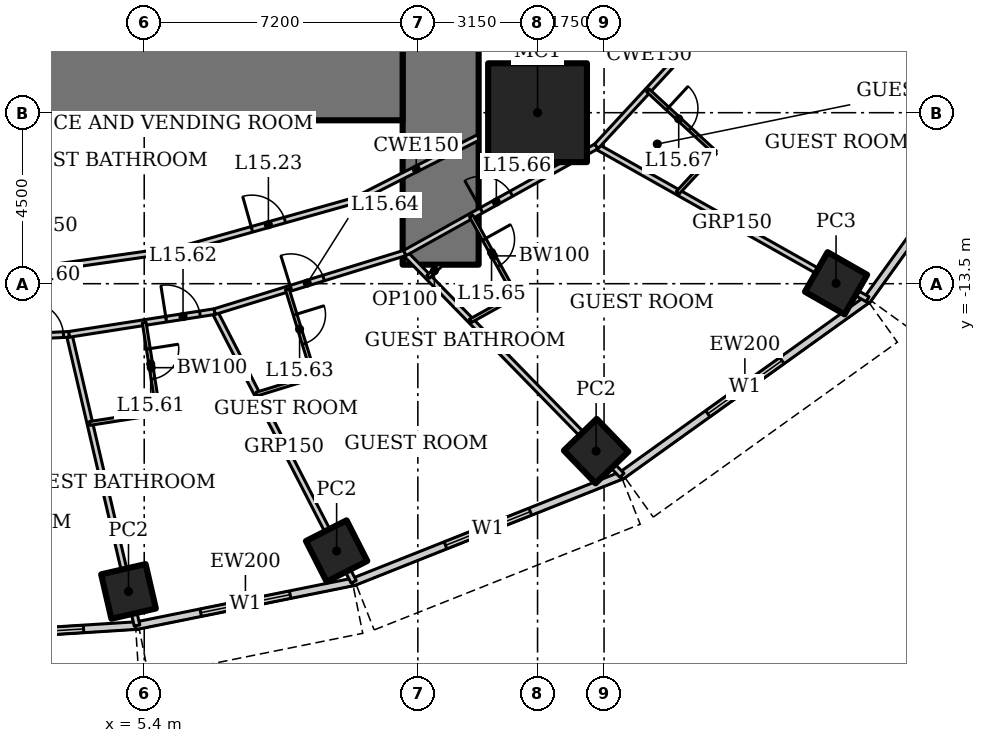
"""IFC4 building model, lengths in metres.
Left out: names, types, materials, properties, quantities, classifications, styles, units other than length and angle.
Written with IfcOpenShell. Run it as: python <this file> out.ifc"""

import sys

from ifc_helpers import new_model, si_unit, direction, frame, frame_2d, origin, origin_2d, place, context, subcontext, project, spatial, rectangle, hollow_rectangle, extrude, element, fill, save


model = new_model("IFC4")
c1 = context("Model", 3, precision=1e-05, world=origin(), true_north=direction((0.0, 1.0)))
c2 = subcontext(c1, "Body", "Model", "MODEL_VIEW")
j1 = project(units=[si_unit("LENGTHUNIT", "METRE"), si_unit("PLANEANGLEUNIT", "RADIAN")], contexts=[c1])
p1 = place(None, origin())
s1 = spatial("IfcSite", under=j1, at=p1, CompositionType="ELEMENT")
p2 = place(p1, origin())
s2 = spatial("IfcBuilding", under=s1, at=p2, CompositionType="ELEMENT")
p3 = place(p2, frame((0.0, 0.0, 69.4)))
s3 = spatial("IfcBuildingStorey", under=s2, at=p3, CompositionType="ELEMENT", Elevation=69.4)
p4 = place(p3, frame((15.75, -9.0, 0.0), z_axis=(0.0, 0.0, 1.0), x_axis=(1.0, 0.0, 0.0)))
e1 = element("IfcColumn", 1, at=p4, inside=s3, PredefinedType="COLUMN", context=c2, shape_type="SweptSolid", body=[
    extrude(hollow_rectangle(XDim=2.6, YDim=2.6, WallThickness=0.13, at=origin_2d()), origin(), (0.0, 0.0, 1.0), 3.6),
])
for number, where, z_axis, x_axis in (
    (2, (4.986, -21.598, 0.0), (0.0, 0.0, 1.0), (0.974, 0.225, 0.0)),
    (3, (10.463, -20.534, 0.0), (0.0, 0.0, 1.0), (0.891, 0.454, 0.0)),
    (4, (17.291, -17.905, 0.0), (0.0, 0.0, 1.0), (0.719, 0.695, 0.0)),
):
    element("IfcColumn", number, at=place(p3, frame(where, z_axis=z_axis, x_axis=x_axis)), inside=s3, PredefinedType="COLUMN", context=c2, shape_type="SweptSolid", body=[
        extrude(hollow_rectangle(XDim=1.2, YDim=1.2, WallThickness=0.1, at=origin_2d()), origin(), (0.0, 0.0, 1.0), 3.6),
    ])
p5 = place(p3, frame((23.605, -13.489, 0.0), z_axis=(0.0, 0.0, 1.0), x_axis=(0.496139221777, 0.86824298017, 0.0)))
e5 = element("IfcColumn", 5, at=p5, inside=s3, PredefinedType="COLUMN", context=c2, shape_type="SweptSolid", body=[
    extrude(hollow_rectangle(XDim=1.2, YDim=1.2, WallThickness=0.12, at=origin_2d()), origin(), (0.0, 0.0, 1.0), 3.6),
])
p6 = place(p3, frame((13.2, -13.0, 0.0), z_axis=(0.0, 0.0, 1.0), x_axis=(0.0, 1.0, 0.0)))
e6 = element("IfcWall", 6, at=p6, inside=s3, PredefinedType="SHEAR", context=c2, shape_type="SweptSolid", body=[
    extrude(rectangle(XDim=26.0, YDim=2.0, at=frame_2d((13.0, 0.0))), origin(), (0.0, 0.0, 1.0), 3.6),
])
p7 = place(p6, frame((12.1, 0.0, 0.0)))
e7 = element("IfcOpeningElement", 7, at=p7, cuts=e6, PredefinedType="OPENING", context=c2, shape_type="SweptSolid", body=[
    extrude(rectangle(XDim=1.8, YDim=2.1, at=frame_2d((0.9, 1.05))), frame((0.0, 1.01, 0.0), z_axis=(0.0, -1.0, 0.0), x_axis=(1.0, 0.0, 0.0)), (0.0, 0.0, 1.0), 2.02),
])
p8 = place(p3, frame((-12.2, -8.0, 0.0), z_axis=(0.0, 0.0, 1.0), x_axis=(1.0, 0.0, 0.0)))
e8 = element("IfcWall", 8, at=p8, inside=s3, PredefinedType="SHEAR", context=c2, shape_type="SweptSolid", body=[
    extrude(rectangle(XDim=24.4, YDim=2.4, at=frame_2d((12.2, 0.0))), origin(), (0.0, 0.0, 1.0), 3.6),
])
p9 = place(p3, frame((-0.041, -22.827, 0.0), z_axis=(0.0, 0.0, 1.0), x_axis=(0.998018582375, 0.062919863585, 0.0)))
e9 = element("IfcWall", 9, at=p9, inside=s3, PredefinedType="SOLIDWALL", context=c2, shape_type="SweptSolid", body=[
    extrude(rectangle(XDim=5.304, YDim=0.2, at=frame_2d((2.652, 0.0))), origin(), (0.0, 0.0, 1.0), 3.45),
])
p10 = place(p9, frame((1.452, 0.0, 0.5)))
e10 = element("IfcOpeningElement", 10, at=p10, cuts=e9, PredefinedType="OPENING", context=c2, shape_type="SweptSolid", body=[
    extrude(rectangle(XDim=2.4, YDim=2.2, at=frame_2d((1.2, 1.1))), frame((0.0, 0.11, 0.0), z_axis=(0.0, -1.0, 0.0), x_axis=(1.0, 0.0, 0.0)), (0.0, 0.0, 1.0), 0.22),
])
p11 = place(p3, frame((5.17, -22.504, 0.0), z_axis=(0.0, 0.0, 1.0), x_axis=(0.980251657452, 0.197754110105, 0.0)))
e11 = element("IfcWall", 11, at=p11, inside=s3, PredefinedType="SOLIDWALL", context=c2, shape_type="SweptSolid", body=[
    extrude(rectangle(XDim=5.904, YDim=0.2, at=frame_2d((2.952, 0.0))), origin(), (0.0, 0.0, 1.0), 3.45),
])
p12 = place(p11, frame((1.752, 0.0, 0.5)))
e12 = element("IfcOpeningElement", 12, at=p12, cuts=e11, PredefinedType="OPENING", context=c2, shape_type="SweptSolid", body=[
    extrude(rectangle(XDim=2.4, YDim=2.2, at=frame_2d((1.2, 1.1))), frame((0.0, 0.11, 0.0), z_axis=(0.0, -1.0, 0.0), x_axis=(1.0, 0.0, 0.0)), (0.0, 0.0, 1.0), 0.22),
])
p13 = place(p3, frame((10.869, -21.363, 0.0), z_axis=(0.0, 0.0, 1.0), x_axis=(0.929358351251, 0.369178892895, 0.0)))
e13 = element("IfcWall", 13, at=p13, inside=s3, PredefinedType="SOLIDWALL", context=c2, shape_type="SweptSolid", body=[
    extrude(rectangle(XDim=7.692, YDim=0.2, at=frame_2d((3.846, 0.0))), origin(), (0.0, 0.0, 1.0), 3.45),
])
p14 = place(p13, frame((2.646, 0.0, 0.5)))
e14 = element("IfcOpeningElement", 14, at=p14, cuts=e13, PredefinedType="OPENING", context=c2, shape_type="SweptSolid", body=[
    extrude(rectangle(XDim=2.4, YDim=2.2, at=frame_2d((1.2, 1.1))), frame((0.0, 0.11, 0.0), z_axis=(0.0, -1.0, 0.0), x_axis=(1.0, 0.0, 0.0)), (0.0, 0.0, 1.0), 0.22),
])
p15 = place(p3, frame((17.929, -18.572, 0.0), z_axis=(0.0, 0.0, 1.0), x_axis=(0.812791321576, 0.582554948112, 0.0)))
e15 = element("IfcWall", 15, at=p15, inside=s3, PredefinedType="SOLIDWALL", context=c2, shape_type="SweptSolid", body=[
    extrude(rectangle(XDim=8.063, YDim=0.2, at=frame_2d((4.032, 0.0))), origin(), (0.0, 0.0, 1.0), 3.45),
])
p16 = place(p15, frame((2.832, 0.0, 0.5)))
e16 = element("IfcOpeningElement", 16, at=p16, cuts=e15, PredefinedType="OPENING", context=c2, shape_type="SweptSolid", body=[
    extrude(rectangle(XDim=2.4, YDim=2.2, at=frame_2d((1.2, 1.1))), frame((0.0, 0.11, 0.0), z_axis=(0.0, -1.0, 0.0), x_axis=(1.0, 0.0, 0.0)), (0.0, 0.0, 1.0), 0.22),
])
p17 = place(p3, frame((24.4, -13.957, 0.0), z_axis=(0.0, 0.0, 1.0), x_axis=(0.583937613703, 0.811798536155, 0.0)))
e17 = element("IfcWall", 17, at=p17, inside=s3, PredefinedType="SOLIDWALL", context=c2, shape_type="SweptSolid", body=[
    extrude(rectangle(XDim=8.323, YDim=0.2, at=frame_2d((4.162, 0.0))), origin(), (0.0, 0.0, 1.0), 3.45),
])
p18 = place(p17, frame((2.961, 0.0, 0.5)))
e18 = element("IfcOpeningElement", 18, at=p18, cuts=e17, PredefinedType="OPENING", context=c2, shape_type="SweptSolid", body=[
    extrude(rectangle(XDim=2.4, YDim=2.2, at=frame_2d((1.2, 1.1))), frame((0.0, 0.11, 0.0), z_axis=(0.0, -1.0, 0.0), x_axis=(1.0, 0.0, 0.0)), (0.0, 0.0, 1.0), 0.22),
])
p19 = place(p3, frame((5.211, -22.496, 0.0), z_axis=(0.0, 0.0, 1.0), x_axis=(-0.227056984461, 0.973881474209, 0.0)))
e19 = element("IfcWall", 19, at=p19, inside=s3, PredefinedType="PARTITIONING", context=c2, shape_type="SweptSolid", body=[
    extrude(rectangle(XDim=7.869, YDim=0.15, at=frame_2d((3.934, 0.0))), origin(), (0.0, 0.0, 1.0), 2.767),
])
p20 = place(p3, frame((10.912, -21.346, 0.0), z_axis=(0.0, 0.0, 1.0), x_axis=(-0.45752665959, 0.889195904042, 0.0)))
e20 = element("IfcWall", 20, at=p20, inside=s3, PredefinedType="PARTITIONING", context=c2, shape_type="SweptSolid", body=[
    extrude(rectangle(XDim=7.997, YDim=0.15, at=frame_2d((3.999, 0.0))), origin(), (0.0, 0.0, 1.0), 2.528),
])
p21 = place(p3, frame((17.97, -18.542, 0.0), z_axis=(0.0, 0.0, 1.0), x_axis=(-0.698757291878, 0.715358823981, 0.0)))
e21 = element("IfcWall", 21, at=p21, inside=s3, PredefinedType="PARTITIONING", context=c2, shape_type="SweptSolid", body=[
    extrude(rectangle(XDim=8.177, YDim=0.15, at=frame_2d((4.088, 0.0))), origin(), (0.0, 0.0, 1.0), 2.528),
])
p22 = place(p3, frame((24.435, -13.909, 0.0), z_axis=(0.0, 0.0, 1.0), x_axis=(-0.871075246657, 0.491149584813, 0.0)))
e22 = element("IfcWall", 22, at=p22, inside=s3, PredefinedType="PARTITIONING", context=c2, shape_type="SweptSolid", body=[
    extrude(rectangle(XDim=8.192, YDim=0.15, at=frame_2d((4.096, 0.0))), origin(), (0.0, 0.0, 1.0), 2.693),
])
p23 = place(p3, frame((0.0, -15.0, 0.0), z_axis=(0.0, 0.0, 1.0), x_axis=(0.998809560203, 0.048779733975, 0.0)))
e23 = element("IfcWall", 23, at=p23, inside=s3, PredefinedType="PARTITIONING", context=c2, shape_type="SweptSolid", body=[
    extrude(rectangle(XDim=3.428, YDim=0.15, at=frame_2d((1.714, 0.0))), origin(), (0.0, 0.0, 1.0), 3.45),
])
p24 = place(p23, frame((2.378, 0.0, 0.0)))
e24 = element("IfcOpeningElement", 24, at=p24, cuts=e23, PredefinedType="OPENING", context=c2, shape_type="SweptSolid", body=[
    extrude(rectangle(XDim=0.9, YDim=2.1, at=frame_2d((0.45, 1.05))), frame((0.0, 0.085, 0.0), z_axis=(0.0, -1.0, 0.0), x_axis=(1.0, 0.0, 0.0)), (0.0, 0.0, 1.0), 0.17),
])
p25 = place(p3, frame((3.424, -14.833, 0.0), z_axis=(0.0, 0.0, 1.0), x_axis=(0.988015036573, 0.154357660987, 0.0)))
e25 = element("IfcWall", 25, at=p25, inside=s3, PredefinedType="PARTITIONING", context=c2, shape_type="SweptSolid", body=[
    extrude(rectangle(XDim=3.875, YDim=0.15, at=frame_2d((1.938, 0.0))), origin(), (0.0, 0.0, 1.0), 3.45),
])
p26 = place(p25, frame((2.583, 0.0, 0.0)))
e26 = element("IfcOpeningElement", 26, at=p26, cuts=e25, PredefinedType="OPENING", context=c2, shape_type="SweptSolid", body=[
    extrude(rectangle(XDim=0.9, YDim=2.1, at=frame_2d((0.45, 1.05))), frame((0.0, 0.085, 0.0), z_axis=(0.0, -1.0, 0.0), x_axis=(1.0, 0.0, 0.0)), (0.0, 0.0, 1.0), 0.17),
])
p27 = place(p3, frame((7.253, -14.235, 0.0), z_axis=(0.0, 0.0, 1.0), x_axis=(0.955657956744, 0.294478980085, 0.0)))
e27 = element("IfcWall", 27, at=p27, inside=s3, PredefinedType="PARTITIONING", context=c2, shape_type="SweptSolid", body=[
    extrude(rectangle(XDim=5.236, YDim=0.15, at=frame_2d((2.618, 0.0))), origin(), (0.0, 0.0, 1.0), 3.45),
])
p28 = place(p27, frame((2.1, 0.0, 0.0)))
e28 = element("IfcOpeningElement", 28, at=p28, cuts=e27, PredefinedType="OPENING", context=c2, shape_type="SweptSolid", body=[
    extrude(rectangle(XDim=0.9, YDim=2.1, at=frame_2d((0.45, 1.05))), frame((0.0, 0.085, 0.0), z_axis=(0.0, -1.0, 0.0), x_axis=(1.0, 0.0, 0.0)), (0.0, 0.0, 1.0), 0.17),
])
p29 = place(p3, frame((12.257, -12.693, 0.0), z_axis=(0.0, 0.0, 1.0), x_axis=(0.873695910579, 0.486472461541, 0.0)))
e29 = element("IfcWall", 29, at=p29, inside=s3, PredefinedType="PARTITIONING", context=c2, shape_type="SweptSolid", body=[
    extrude(rectangle(XDim=5.771, YDim=0.15, at=frame_2d((2.885, 0.0))), origin(), (0.0, 0.0, 1.0), 3.45),
])
p30 = place(p29, frame((2.306, 0.0, 0.0)))
e30 = element("IfcOpeningElement", 30, at=p30, cuts=e29, PredefinedType="OPENING", context=c2, shape_type="SweptSolid", body=[
    extrude(rectangle(XDim=0.9, YDim=2.1, at=frame_2d((0.45, 1.05))), frame((0.0, 0.085, 0.0), z_axis=(0.0, -1.0, 0.0), x_axis=(1.0, 0.0, 0.0)), (0.0, 0.0, 1.0), 0.17),
])
p31 = place(p3, frame((17.299, -9.885, 0.0), z_axis=(0.0, 0.0, 1.0), x_axis=(0.678641806296, 0.734469399463, 0.0)))
e31 = element("IfcWall", 31, at=p31, inside=s3, PredefinedType="PARTITIONING", context=c2, shape_type="SweptSolid", body=[
    extrude(rectangle(XDim=6.166, YDim=0.15, at=frame_2d((3.083, 0.0))), origin(), (0.0, 0.0, 1.0), 3.45),
])
p32 = place(p31, frame((5.116, 0.0, 0.0)))
e32 = element("IfcOpeningElement", 32, at=p32, cuts=e31, PredefinedType="OPENING", context=c2, shape_type="SweptSolid", body=[
    extrude(rectangle(XDim=0.9, YDim=2.1, at=frame_2d((0.45, 1.05))), frame((0.0, 0.085, 0.0), z_axis=(0.0, -1.0, 0.0), x_axis=(1.0, 0.0, 0.0)), (0.0, 0.0, 1.0), 0.17),
])
p33 = place(p3, frame((3.016, -13.066, 0.0), z_axis=(0.0, 0.0, 1.0), x_axis=(0.990002114939, 0.14105251652, 0.0)))
e33 = element("IfcWall", 33, at=p33, inside=s3, PredefinedType="PARTITIONING", context=c2, shape_type="SweptSolid", body=[
    extrude(rectangle(XDim=3.429, YDim=0.15, at=frame_2d((1.714, 0.0))), origin(), (0.0, 0.0, 1.0), 3.45),
])
p34 = place(p3, frame((6.411, -12.582, 0.0), z_axis=(0.0, 0.0, 1.0), x_axis=(0.962643729928, 0.270771211967, 0.0)))
e34 = element("IfcWall", 34, at=p34, inside=s3, PredefinedType="PARTITIONING", context=c2, shape_type="SweptSolid", body=[
    extrude(rectangle(XDim=4.688, YDim=0.15, at=frame_2d((2.344, 0.0))), origin(), (0.0, 0.0, 1.0), 3.45),
])
p35 = place(p34, frame((1.894, 0.0, 0.0)))
e35 = element("IfcOpeningElement", 35, at=p35, cuts=e34, PredefinedType="OPENING", context=c2, shape_type="SweptSolid", body=[
    extrude(rectangle(XDim=0.9, YDim=2.1, at=frame_2d((0.45, 1.05))), frame((0.0, 0.085, 0.0), z_axis=(0.0, -1.0, 0.0), x_axis=(1.0, 0.0, 0.0)), (0.0, 0.0, 1.0), 0.17),
])
p36 = place(p3, frame((5.4, -14.524, 0.0), z_axis=(0.0, 0.0, 1.0), x_axis=(0.154426532979, -0.988004274238, 0.0)))
e36 = element("IfcWall", 36, at=p36, inside=s3, PredefinedType="PARTITIONING", context=c2, shape_type="SweptSolid", body=[
    extrude(rectangle(XDim=2.4, YDim=0.1, at=frame_2d((1.2, 0.0))), origin(), (0.0, 0.0, 1.0), 3.45),
])
p37 = place(p36, frame((0.7, 0.0, 0.0)))
e37 = element("IfcOpeningElement", 37, at=p37, cuts=e36, PredefinedType="OPENING", context=c2, shape_type="SweptSolid", body=[
    extrude(rectangle(XDim=0.8, YDim=2.1, at=frame_2d((0.4, 1.05))), frame((0.0, 0.06, 0.0), z_axis=(0.0, -1.0, 0.0), x_axis=(1.0, 0.0, 0.0)), (0.0, 0.0, 1.0), 0.12),
])
p38 = place(p3, frame((5.771, -16.895, 0.0), z_axis=(0.0, 0.0, 1.0), x_axis=(-0.98801840204, -0.154336117711, 0.0)))
e38 = element("IfcWall", 38, at=p38, inside=s3, PredefinedType="PARTITIONING", context=c2, shape_type="SweptSolid", body=[
    extrude(rectangle(XDim=1.827, YDim=0.1, at=frame_2d((0.914, 0.0))), origin(), (0.0, 0.0, 1.0), 3.45),
])
p39 = place(p3, frame((9.164, -13.646, 0.0), z_axis=(0.0, 0.0, 1.0), x_axis=(0.294507586191, -0.955649141514, 0.0)))
e39 = element("IfcWall", 39, at=p39, inside=s3, PredefinedType="PARTITIONING", context=c2, shape_type="SweptSolid", body=[
    extrude(rectangle(XDim=2.4, YDim=0.1, at=frame_2d((1.2, 0.0))), origin(), (0.0, 0.0, 1.0), 3.45),
])
p40 = place(p39, frame((0.7, 0.0, 0.0)))
e40 = element("IfcOpeningElement", 40, at=p40, cuts=e39, PredefinedType="OPENING", context=c2, shape_type="SweptSolid", body=[
    extrude(rectangle(XDim=0.8, YDim=2.1, at=frame_2d((0.4, 1.05))), frame((0.0, 0.06, 0.0), z_axis=(0.0, -1.0, 0.0), x_axis=(1.0, 0.0, 0.0)), (0.0, 0.0, 1.0), 0.12),
])
p41 = place(p3, frame((9.871, -15.939, 0.0), z_axis=(0.0, 0.0, 1.0), x_axis=(-0.955642133669, -0.29453032502, 0.0)))
e41 = element("IfcWall", 41, at=p41, inside=s3, PredefinedType="PARTITIONING", context=c2, shape_type="SweptSolid", body=[
    extrude(rectangle(XDim=1.583, YDim=0.1, at=frame_2d((0.791, 0.0))), origin(), (0.0, 0.0, 1.0), 3.45),
])
p42 = place(p3, frame((14.004, -11.719, 0.0), z_axis=(0.0, 0.0, 1.0), x_axis=(0.486445964861, -0.873710663361, 0.0)))
e42 = element("IfcWall", 42, at=p42, inside=s3, PredefinedType="PARTITIONING", context=c2, shape_type="SweptSolid", body=[
    extrude(rectangle(XDim=2.4, YDim=0.1, at=frame_2d((1.2, 0.0))), origin(), (0.0, 0.0, 1.0), 3.45),
])
p43 = place(p42, frame((0.7, 0.0, 0.0)))
e43 = element("IfcOpeningElement", 43, at=p43, cuts=e42, PredefinedType="OPENING", context=c2, shape_type="SweptSolid", body=[
    extrude(rectangle(XDim=0.8, YDim=2.1, at=frame_2d((0.4, 1.05))), frame((0.0, 0.06, 0.0), z_axis=(0.0, -1.0, 0.0), x_axis=(1.0, 0.0, 0.0)), (0.0, 0.0, 1.0), 0.12),
])
p44 = place(p3, frame((15.172, -13.816, 0.0), z_axis=(0.0, 0.0, 1.0), x_axis=(-0.873640924532, -0.486571202377, 0.0)))
e44 = element("IfcWall", 44, at=p44, inside=s3, PredefinedType="PARTITIONING", context=c2, shape_type="SweptSolid", body=[
    extrude(rectangle(XDim=1.362, YDim=0.1, at=frame_2d((0.681, 0.0))), origin(), (0.0, 0.0, 1.0), 3.45),
])
p45 = place(p3, frame((18.656, -8.416, 0.0), z_axis=(0.0, 0.0, 1.0), x_axis=(0.73447964986, -0.678630712495, 0.0)))
e45 = element("IfcWall", 45, at=p45, inside=s3, PredefinedType="PARTITIONING", context=c2, shape_type="SweptSolid", body=[
    extrude(rectangle(XDim=2.4, YDim=0.1, at=frame_2d((1.2, 0.0))), origin(), (0.0, 0.0, 1.0), 3.45),
])
p46 = place(p45, frame((0.7, 0.0, 0.0)))
e46 = element("IfcOpeningElement", 46, at=p46, cuts=e45, PredefinedType="OPENING", context=c2, shape_type="SweptSolid", body=[
    extrude(rectangle(XDim=0.8, YDim=2.1, at=frame_2d((0.4, 1.05))), frame((0.0, 0.06, 0.0), z_axis=(0.0, -1.0, 0.0), x_axis=(1.0, 0.0, 0.0)), (0.0, 0.0, 1.0), 0.12),
])
p47 = place(p3, frame((20.419, -10.045, 0.0), z_axis=(0.0, 0.0, 1.0), x_axis=(-0.67861657312, -0.734492713842, 0.0)))
e47 = element("IfcWall", 47, at=p47, inside=s3, PredefinedType="PARTITIONING", context=c2, shape_type="SweptSolid", body=[
    extrude(rectangle(XDim=1.446, YDim=0.1, at=frame_2d((0.723, 0.0))), origin(), (0.0, 0.0, 1.0), 3.45),
])
p48 = place(p3, frame((13.2, -13.0, 0.0), z_axis=(0.0, 0.0, 1.0), x_axis=(-0.715289751842, -0.698827998087, 0.0)))
e48 = element("IfcWall", 48, at=p48, inside=s3, PredefinedType="PARTITIONING", context=c2, shape_type="SweptSolid", body=[
    extrude(rectangle(XDim=0.46, YDim=0.1, at=frame_2d((0.23, 0.0))), origin(), (0.0, 0.0, 1.0), 3.45),
])
p49 = place(p3, frame((2.035, -13.109, 0.0), z_axis=(0.0, 0.0, 1.0), x_axis=(0.999010128674, 0.044483286824, 0.0)))
e49 = element("IfcWall", 49, at=p49, inside=s3, PredefinedType="PARTITIONING", context=c2, shape_type="SweptSolid", body=[
    extrude(rectangle(XDim=0.982, YDim=0.15, at=frame_2d((0.491, 0.0))), origin(), (0.0, 0.0, 1.0), 3.45),
])
p50 = place(p3, frame((10.924, -11.312, 0.0), z_axis=(0.0, 0.0, 1.0), x_axis=(0.891394713219, 0.453227829292, 0.0)))
e50 = element("IfcWall", 50, at=p50, inside=s3, PredefinedType="PARTITIONING", context=c2, shape_type="SweptSolid", body=[
    extrude(rectangle(XDim=3.664, YDim=0.15, at=frame_2d((1.832, 0.0))), origin(), (0.0, 0.0, 1.0), 3.45),
])
p51 = place(p10, origin())
e51 = element("IfcWindow", 51, at=p51, inside=s3, PartitioningType="SINGLE_PANEL", PredefinedType="WINDOW", context=c2, shape_type="SweptSolid", body=[
    extrude(rectangle(XDim=2.4, YDim=2.2, at=frame_2d((1.2, 1.1))), frame((0.0, 0.03, 0.0), z_axis=(0.0, -1.0, 0.0), x_axis=(1.0, 0.0, 0.0)), (0.0, 0.0, 1.0), 0.06),
])
fill(e10, e51)
p52 = place(p12, origin())
e52 = element("IfcWindow", 52, at=p52, inside=s3, PartitioningType="SINGLE_PANEL", PredefinedType="WINDOW", context=c2, shape_type="SweptSolid", body=[
    extrude(rectangle(XDim=2.4, YDim=2.2, at=frame_2d((1.2, 1.1))), frame((0.0, 0.03, 0.0), z_axis=(0.0, -1.0, 0.0), x_axis=(1.0, 0.0, 0.0)), (0.0, 0.0, 1.0), 0.06),
])
fill(e12, e52)
p53 = place(p14, origin())
e53 = element("IfcWindow", 53, at=p53, inside=s3, PartitioningType="SINGLE_PANEL", PredefinedType="WINDOW", context=c2, shape_type="SweptSolid", body=[
    extrude(rectangle(XDim=2.4, YDim=2.2, at=frame_2d((1.2, 1.1))), frame((0.0, 0.03, 0.0), z_axis=(0.0, -1.0, 0.0), x_axis=(1.0, 0.0, 0.0)), (0.0, 0.0, 1.0), 0.06),
])
fill(e14, e53)
p54 = place(p16, origin())
e54 = element("IfcWindow", 54, at=p54, inside=s3, PartitioningType="SINGLE_PANEL", PredefinedType="WINDOW", context=c2, shape_type="SweptSolid", body=[
    extrude(rectangle(XDim=2.4, YDim=2.2, at=frame_2d((1.2, 1.1))), frame((0.0, 0.03, 0.0), z_axis=(0.0, -1.0, 0.0), x_axis=(1.0, 0.0, 0.0)), (0.0, 0.0, 1.0), 0.06),
])
fill(e16, e54)
p55 = place(p35, origin())
e55 = element("IfcDoor", 55, at=p55, inside=s3, OperationType="SINGLE_SWING_LEFT", PredefinedType="DOOR", context=c2, shape_type="SweptSolid", body=[
    extrude(rectangle(XDim=0.9, YDim=2.1, at=frame_2d((0.45, 1.05))), frame((0.0, 0.025, 0.0), z_axis=(0.0, -1.0, 0.0), x_axis=(1.0, 0.0, 0.0)), (0.0, 0.0, 1.0), 0.05),
])
fill(e35, e55)
p56 = place(p24, origin())
e56 = element("IfcDoor", 56, at=p56, inside=s3, OperationType="SINGLE_SWING_LEFT", PredefinedType="DOOR", context=c2, shape_type="SweptSolid", body=[
    extrude(rectangle(XDim=0.9, YDim=2.1, at=frame_2d((0.45, 1.05))), frame((0.0, 0.025, 0.0), z_axis=(0.0, -1.0, 0.0), x_axis=(1.0, 0.0, 0.0)), (0.0, 0.0, 1.0), 0.05),
])
fill(e24, e56)
p57 = place(p37, origin())
e57 = element("IfcDoor", 57, at=p57, inside=s3, OperationType="SINGLE_SWING_LEFT", PredefinedType="DOOR", context=c2, shape_type="SweptSolid", body=[
    extrude(rectangle(XDim=0.8, YDim=2.1, at=frame_2d((0.4, 1.05))), frame((0.0, 0.025, 0.0), z_axis=(0.0, -1.0, 0.0), x_axis=(1.0, 0.0, 0.0)), (0.0, 0.0, 1.0), 0.05),
])
fill(e37, e57)
p58 = place(p26, origin())
e58 = element("IfcDoor", 58, at=p58, inside=s3, OperationType="SINGLE_SWING_LEFT", PredefinedType="DOOR", context=c2, shape_type="SweptSolid", body=[
    extrude(rectangle(XDim=0.9, YDim=2.1, at=frame_2d((0.45, 1.05))), frame((0.0, 0.025, 0.0), z_axis=(0.0, -1.0, 0.0), x_axis=(1.0, 0.0, 0.0)), (0.0, 0.0, 1.0), 0.05),
])
fill(e26, e58)
p59 = place(p40, origin())
e59 = element("IfcDoor", 59, at=p59, inside=s3, OperationType="SINGLE_SWING_LEFT", PredefinedType="DOOR", context=c2, shape_type="SweptSolid", body=[
    extrude(rectangle(XDim=0.8, YDim=2.1, at=frame_2d((0.4, 1.05))), frame((0.0, 0.025, 0.0), z_axis=(0.0, -1.0, 0.0), x_axis=(1.0, 0.0, 0.0)), (0.0, 0.0, 1.0), 0.05),
])
fill(e40, e59)
p60 = place(p28, origin())
e60 = element("IfcDoor", 60, at=p60, inside=s3, OperationType="SINGLE_SWING_LEFT", PredefinedType="DOOR", context=c2, shape_type="SweptSolid", body=[
    extrude(rectangle(XDim=0.9, YDim=2.1, at=frame_2d((0.45, 1.05))), frame((0.0, 0.025, 0.0), z_axis=(0.0, -1.0, 0.0), x_axis=(1.0, 0.0, 0.0)), (0.0, 0.0, 1.0), 0.05),
])
fill(e28, e60)
p61 = place(p43, origin())
e61 = element("IfcDoor", 61, at=p61, inside=s3, OperationType="SINGLE_SWING_LEFT", PredefinedType="DOOR", context=c2, shape_type="SweptSolid", body=[
    extrude(rectangle(XDim=0.8, YDim=2.1, at=frame_2d((0.4, 1.05))), frame((0.0, 0.025, 0.0), z_axis=(0.0, -1.0, 0.0), x_axis=(1.0, 0.0, 0.0)), (0.0, 0.0, 1.0), 0.05),
])
fill(e43, e61)
p62 = place(p30, origin())
e62 = element("IfcDoor", 62, at=p62, inside=s3, OperationType="SINGLE_SWING_LEFT", PredefinedType="DOOR", context=c2, shape_type="SweptSolid", body=[
    extrude(rectangle(XDim=0.9, YDim=2.1, at=frame_2d((0.45, 1.05))), frame((0.0, 0.025, 0.0), z_axis=(0.0, -1.0, 0.0), x_axis=(1.0, 0.0, 0.0)), (0.0, 0.0, 1.0), 0.05),
])
fill(e30, e62)
p63 = place(p46, origin())
e63 = element("IfcDoor", 63, at=p63, inside=s3, OperationType="SINGLE_SWING_LEFT", PredefinedType="DOOR", context=c2, shape_type="SweptSolid", body=[
    extrude(rectangle(XDim=0.8, YDim=2.1, at=frame_2d((0.4, 1.05))), frame((0.0, 0.025, 0.0), z_axis=(0.0, -1.0, 0.0), x_axis=(1.0, 0.0, 0.0)), (0.0, 0.0, 1.0), 0.05),
])
fill(e46, e63)
save(model, sys.argv[1])
